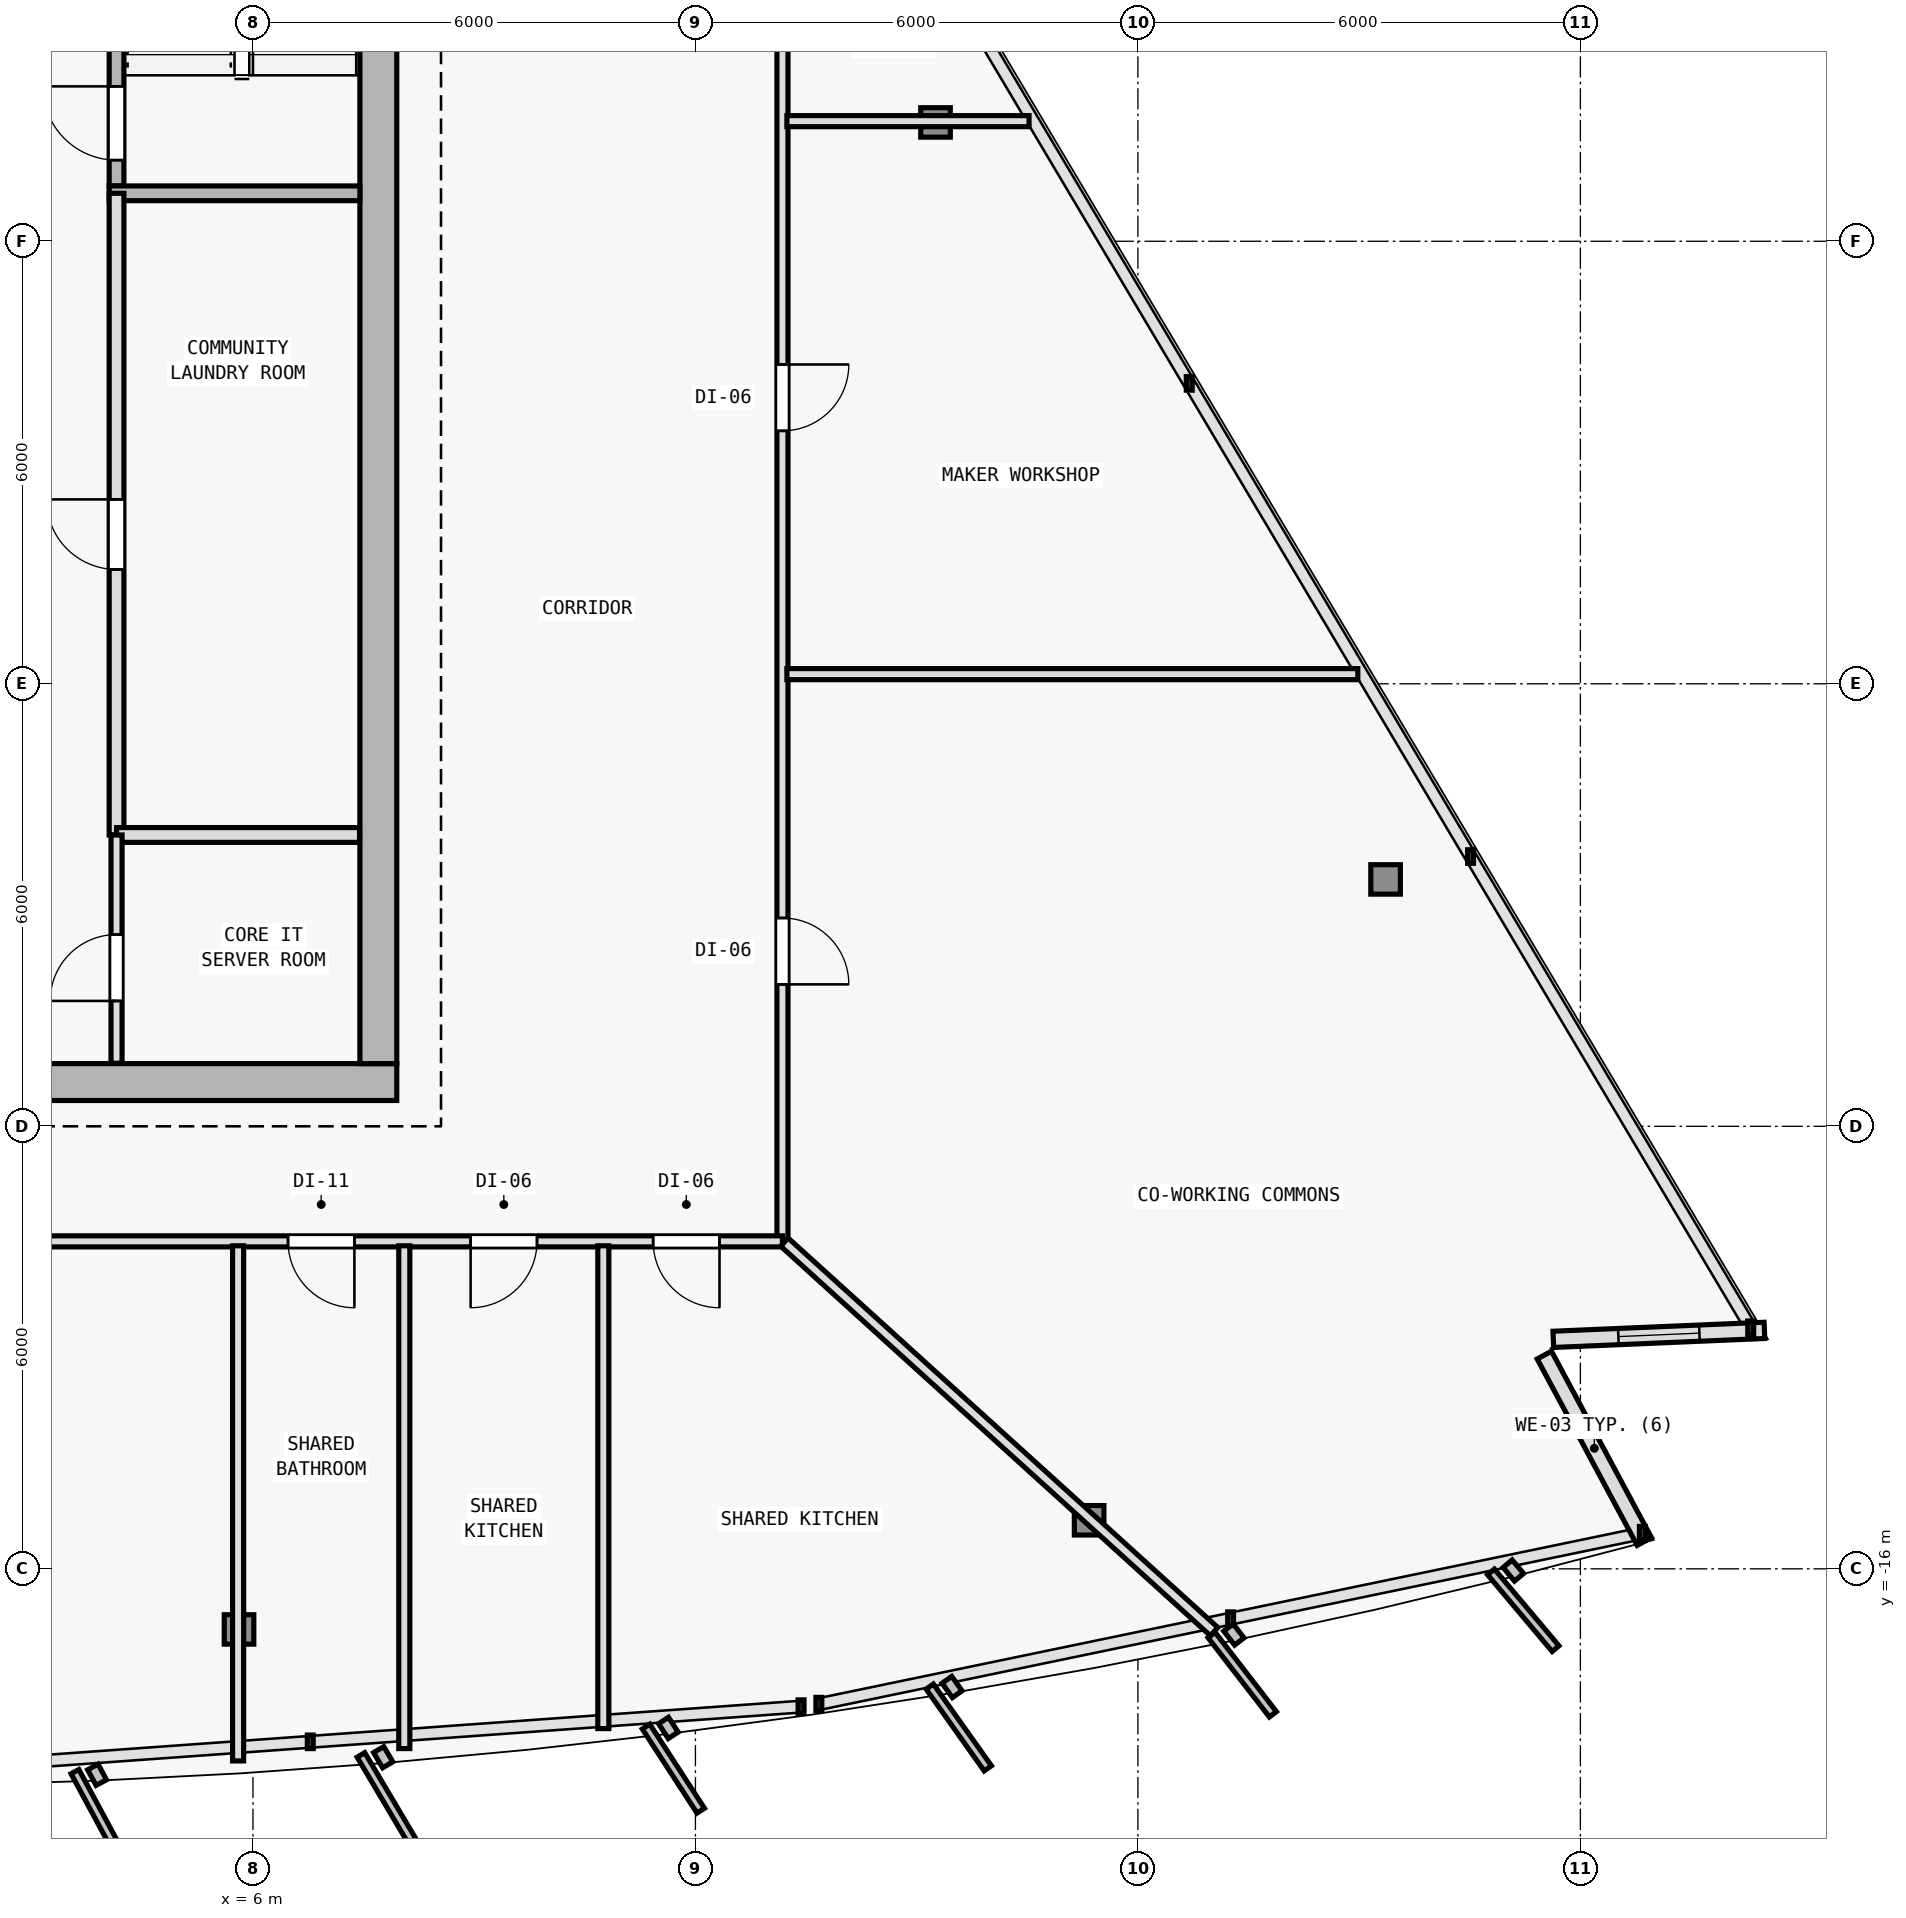
"""IFC4 building model, lengths in metres.
Left out: names, types, materials, properties, quantities, classifications, styles, units other than length and angle.
Written with IfcOpenShell. Run it as: python <this file> out.ifc"""

import sys

from ifc_helpers import new_model, si_unit, direction, frame, frame_2d, origin, origin_2d, place, context, subcontext, project, spatial, rectangle, i_section, extrude, element, fill, save


model = new_model("IFC4")
c1 = context("Model", 3, precision=1e-05, world=origin(), true_north=direction((0.0, 1.0)))
c2 = subcontext(c1, "Body", "Model", "MODEL_VIEW")
j1 = project(units=[si_unit("LENGTHUNIT", "METRE"), si_unit("PLANEANGLEUNIT", "RADIAN")], contexts=[c1])
p1 = place(None, origin())
s1 = spatial("IfcSite", under=j1, at=p1, CompositionType="ELEMENT")
p2 = place(p1, origin())
s2 = spatial("IfcBuilding", under=s1, at=p2, CompositionType="ELEMENT")
p3 = place(p2, frame((0.0, 0.0, 178.2)))
s3 = spatial("IfcBuildingStorey", under=s2, at=p3, CompositionType="ELEMENT", Elevation=178.2)
for number, where, z_axis, x_axis in (
    (1, (7.7, -9.4, 0.0), (0.0, 0.0, 1.0), (1.0, 0.0, 0.0)),
    (2, (7.7, 0.4, 0.0), (0.0, 0.0, 1.0), (1.0, 0.0, 0.0)),
):
    element("IfcColumn", number, at=place(p3, frame(where, z_axis=z_axis, x_axis=x_axis)), inside=s3, PredefinedType="COLUMN", context=c2, shape_type="SweptSolid", body=[
        extrude(i_section(OverallWidth=0.404, OverallDepth=0.407, WebThickness=0.017, FlangeThickness=0.028, FilletRadius=0.015, at=origin_2d()), origin(), (0.0, 0.0, 1.0), 3.6),
    ])
p4 = place(p3, frame((5.811, -16.822, 0.006), z_axis=(-0.006934288159, 0.035283289748, 0.999353293441), x_axis=(-0.981229659911, -0.192842823335, 0.0)))
e3 = element("IfcColumn", 3, at=p4, inside=s3, PredefinedType="COLUMN", context=c2, shape_type="SweptSolid", body=[
    extrude(i_section(OverallWidth=0.401, OverallDepth=0.399, WebThickness=0.016, FlangeThickness=0.025, FilletRadius=0.015, at=origin_2d()), origin(), (0.0, 0.0, 1.0), 3.591),
])
p5 = place(p3, frame((17.338, -15.342, 0.006), z_axis=(-0.020596292833, 0.033511459955, 0.999226087917), x_axis=(-0.851954850327, -0.523615252838, 0.0)))
e4 = element("IfcColumn", 4, at=p5, inside=s3, PredefinedType="COLUMN", context=c2, shape_type="SweptSolid", body=[
    extrude(i_section(OverallWidth=0.401, OverallDepth=0.399, WebThickness=0.016, FlangeThickness=0.025, FilletRadius=0.015, at=origin_2d()), origin(), (0.0, 0.0, 1.0), 3.592),
])
p6 = place(p3, frame((21.358, -6.653, 0.006), z_axis=(-0.026107436898, 0.021620221181, 0.999425318758), x_axis=(-0.637813971185, -0.770190455771, 0.0)))
e5 = element("IfcColumn", 5, at=p6, inside=s3, PredefinedType="COLUMN", context=c2, shape_type="SweptSolid", body=[
    extrude(i_section(OverallWidth=0.401, OverallDepth=0.399, WebThickness=0.016, FlangeThickness=0.025, FilletRadius=0.015, at=origin_2d()), origin(), (0.0, 0.0, 1.0), 3.591),
])
p7 = place(p3, frame((15.255, 3.611, 0.006), z_axis=(-0.018907314261, 0.009589680974, 0.999775250487), x_axis=(-0.452339157861, -0.891845999187, 0.0)))
e6 = element("IfcColumn", 6, at=p7, inside=s3, PredefinedType="COLUMN", context=c2, shape_type="SweptSolid", body=[
    extrude(i_section(OverallWidth=0.401, OverallDepth=0.399, WebThickness=0.016, FlangeThickness=0.025, FilletRadius=0.015, at=origin_2d()), origin(), (0.0, 0.0, 1.0), 3.59),
])
p8 = place(p3, frame((23.511, -13.102, 0.0), z_axis=(0.0, 0.0, 1.0), x_axis=(0.472804807667, -0.881167188362, 0.0)))
e7 = element("IfcWall", 7, at=p8, inside=s3, PredefinedType="SOLIDWALL", context=c2, shape_type="SweptSolid", body=[
    extrude(rectangle(XDim=2.868, YDim=0.22, at=frame_2d((1.434, 0.0))), origin(), (0.0, 0.0, 1.0), 3.35),
])
p9 = place(p3, frame((26.496, -12.767, 0.0), z_axis=(0.0, 0.0, 1.0), x_axis=(-0.999095763679, -0.042516526188, 0.0)))
e8 = element("IfcWall", 8, at=p9, inside=s3, PredefinedType="SOLIDWALL", context=c2, shape_type="SweptSolid", body=[
    extrude(rectangle(XDim=2.865, YDim=0.22, at=frame_2d((1.433, 0.0))), origin(), (0.0, 0.0, 1.0), 3.35),
])
p10 = place(p9, frame((0.883, 0.0, 0.62)))
e9 = element("IfcOpeningElement", 9, at=p10, cuts=e8, PredefinedType="OPENING", context=c2, shape_type="SweptSolid", body=[
    extrude(rectangle(XDim=1.1, YDim=1.8, at=frame_2d((0.55, 0.9))), frame((0.0, 0.12, 0.0), z_axis=(0.0, -1.0, 0.0), x_axis=(1.0, 0.0, 0.0)), (0.0, 0.0, 1.0), 0.24),
])
p11 = place(p3, frame((-7.95, -9.4, 0.0), z_axis=(0.0, 0.0, 1.0), x_axis=(1.0, 0.0, 0.0)))
e10 = element("IfcWall", 10, at=p11, inside=s3, PredefinedType="SHEAR", context=c2, shape_type="SweptSolid", body=[
    extrude(rectangle(XDim=15.9, YDim=0.5, at=frame_2d((7.95, 0.0))), origin(), (0.0, 0.0, 1.0), 3.35),
])
p12 = place(p11, frame((9.6, 0.0, 0.0)))
e11 = element("IfcOpeningElement", 11, at=p12, cuts=e10, PredefinedType="OPENING", context=c2, shape_type="SweptSolid", body=[
    extrude(rectangle(XDim=1.5, YDim=2.2, at=frame_2d((0.75, 1.1))), frame((0.0, 0.26, 0.0), z_axis=(0.0, -1.0, 0.0), x_axis=(1.0, 0.0, 0.0)), (0.0, 0.0, 1.0), 0.52),
])
p13 = place(p3, frame((7.7, 9.95, 0.0), z_axis=(0.0, 0.0, 1.0), x_axis=(0.0, -1.0, 0.0)))
e12 = element("IfcWall", 12, at=p13, inside=s3, PredefinedType="SHEAR", context=c2, shape_type="SweptSolid", body=[
    extrude(rectangle(XDim=19.1, YDim=0.5, at=frame_2d((9.55, 0.0))), origin(), (0.0, 0.0, 1.0), 3.35),
])
p14 = place(p3, frame((4.15, 2.75, 0.0), z_axis=(0.0, 0.0, 1.0), x_axis=(0.0, 1.0, 0.0)))
e13 = element("IfcWall", 13, at=p14, inside=s3, PredefinedType="SOLIDWALL", context=c2, shape_type="SweptSolid", body=[
    extrude(rectangle(XDim=7.2, YDim=0.2, at=frame_2d((3.6, 0.0))), origin(), (0.0, 0.0, 1.0), 3.35),
])
p15 = place(p14, frame((0.35, 0.0, 0.0)))
e14 = element("IfcOpeningElement", 14, at=p15, cuts=e13, PredefinedType="OPENING", context=c2, shape_type="SweptSolid", body=[
    extrude(rectangle(XDim=1.0, YDim=2.15, at=frame_2d((0.5, 1.075))), frame((0.0, 0.11, 0.0), z_axis=(0.0, -1.0, 0.0), x_axis=(1.0, 0.0, 0.0)), (0.0, 0.0, 1.0), 0.22),
])
p16 = place(p3, frame((4.05, 2.65, 0.0), z_axis=(0.0, 0.0, 1.0), x_axis=(1.0, 0.0, 0.0)))
e15 = element("IfcWall", 15, at=p16, inside=s3, PredefinedType="SOLIDWALL", context=c2, shape_type="SweptSolid", body=[
    extrude(rectangle(XDim=3.4, YDim=0.2, at=frame_2d((1.7, 0.0))), origin(), (0.0, 0.0, 1.0), 3.35),
])
p17 = place(p3, frame((4.15, -6.05, 0.0), z_axis=(0.0, 0.0, 1.0), x_axis=(0.0, 1.0, 0.0)))
e16 = element("IfcWall", 16, at=p17, inside=s3, PredefinedType="SOLIDWALL", context=c2, shape_type="SweptSolid", body=[
    extrude(rectangle(XDim=8.7, YDim=0.2, at=frame_2d((4.35, 0.0))), origin(), (0.0, 0.0, 1.0), 3.35),
])
p18 = place(p17, frame((3.6, 0.0, 0.0)))
e17 = element("IfcOpeningElement", 17, at=p18, cuts=e16, PredefinedType="OPENING", context=c2, shape_type="SweptSolid", body=[
    extrude(rectangle(XDim=0.95, YDim=2.1, at=frame_2d((0.475, 1.05))), frame((0.0, 0.11, 0.0), z_axis=(0.0, -1.0, 0.0), x_axis=(1.0, 0.0, 0.0)), (0.0, 0.0, 1.0), 0.22),
])
p19 = place(p3, frame((4.15, -6.05, 0.0), z_axis=(0.0, 0.0, 1.0), x_axis=(1.0, 0.0, 0.0)))
e18 = element("IfcWall", 18, at=p19, inside=s3, PredefinedType="SOLIDWALL", context=c2, shape_type="SweptSolid", body=[
    extrude(rectangle(XDim=3.295, YDim=0.2, at=frame_2d((1.647, 0.0))), origin(), (0.0, 0.0, 1.0), 3.35),
])
p20 = place(p3, frame((4.15, -9.145, 0.0), z_axis=(0.0, 0.0, 1.0), x_axis=(0.0, 1.0, 0.0)))
e19 = element("IfcWall", 19, at=p20, inside=s3, PredefinedType="PARTITIONING", context=c2, shape_type="SweptSolid", body=[
    extrude(rectangle(XDim=3.095, YDim=0.15, at=frame_2d((1.547, 0.0))), origin(), (0.0, 0.0, 1.0), 3.35),
])
p21 = place(p20, frame((0.845, 0.0, 0.0)))
e20 = element("IfcOpeningElement", 20, at=p21, cuts=e19, PredefinedType="OPENING", context=c2, shape_type="SweptSolid", body=[
    extrude(rectangle(XDim=0.9, YDim=2.1, at=frame_2d((0.45, 1.05))), frame((0.0, 0.085, 0.0), z_axis=(0.0, -1.0, 0.0), x_axis=(1.0, 0.0, 0.0)), (0.0, 0.0, 1.0), 0.17),
])
p22 = place(p3, frame((13.18, 8.444, 0.0), z_axis=(0.0, 0.0, 1.0), x_axis=(0.0, -1.0, 0.0)))
e21 = element("IfcWall", 21, at=p22, inside=s3, PredefinedType="PARTITIONING", context=c2, shape_type="SweptSolid", body=[
    extrude(rectangle(XDim=20.004, YDim=0.15, at=frame_2d((10.002, 0.0))), origin(), (0.0, 0.0, 1.0), 2.825),
])
p23 = place(p22, frame((15.619, 0.0, 0.0)))
e22 = element("IfcOpeningElement", 22, at=p23, cuts=e21, PredefinedType="OPENING", context=c2, shape_type="SweptSolid", body=[
    extrude(rectangle(XDim=0.9, YDim=2.1, at=frame_2d((0.45, 1.05))), frame((0.0, 0.085, 0.0), z_axis=(0.0, -1.0, 0.0), x_axis=(1.0, 0.0, 0.0)), (0.0, 0.0, 1.0), 0.17),
])
p24 = place(p22, frame((8.115, 0.0, 0.0)))
e23 = element("IfcOpeningElement", 23, at=p24, cuts=e21, PredefinedType="OPENING", context=c2, shape_type="SweptSolid", body=[
    extrude(rectangle(XDim=0.9, YDim=2.1, at=frame_2d((0.45, 1.05))), frame((0.0, 0.085, 0.0), z_axis=(0.0, -1.0, 0.0), x_axis=(1.0, 0.0, 0.0)), (0.0, 0.0, 1.0), 0.17),
])
p25 = place(p22, frame((2.047, 0.0, 0.0)))
e24 = element("IfcOpeningElement", 24, at=p25, cuts=e21, PredefinedType="OPENING", context=c2, shape_type="SweptSolid", body=[
    extrude(rectangle(XDim=0.9, YDim=2.1, at=frame_2d((0.45, 1.05))), frame((0.0, 0.085, 0.0), z_axis=(0.0, -1.0, 0.0), x_axis=(1.0, 0.0, 0.0)), (0.0, 0.0, 1.0), 0.17),
])
p26 = place(p3, frame((13.18, -11.56, 0.0), z_axis=(0.0, 0.0, 1.0), x_axis=(-1.0, 0.0, 0.0)))
e25 = element("IfcWall", 25, at=p26, inside=s3, PredefinedType="PARTITIONING", context=c2, shape_type="SweptSolid", body=[
    extrude(rectangle(XDim=23.04, YDim=0.15, at=frame_2d((11.52, 0.0))), origin(), (0.0, 0.0, 1.0), 2.825),
])
p27 = place(p26, frame((14.671, 0.0, 0.0)))
e26 = element("IfcOpeningElement", 26, at=p27, cuts=e25, PredefinedType="OPENING", context=c2, shape_type="SweptSolid", body=[
    extrude(rectangle(XDim=0.9, YDim=2.1, at=frame_2d((0.45, 1.05))), frame((0.0, 0.085, 0.0), z_axis=(0.0, -1.0, 0.0), x_axis=(1.0, 0.0, 0.0)), (0.0, 0.0, 1.0), 0.17),
])
p28 = place(p26, frame((5.805, 0.0, 0.0)))
e27 = element("IfcOpeningElement", 27, at=p28, cuts=e25, PredefinedType="OPENING", context=c2, shape_type="SweptSolid", body=[
    extrude(rectangle(XDim=0.9, YDim=2.1, at=frame_2d((0.45, 1.05))), frame((0.0, 0.085, 0.0), z_axis=(0.0, -1.0, 0.0), x_axis=(1.0, 0.0, 0.0)), (0.0, 0.0, 1.0), 0.17),
])
p29 = place(p26, frame((3.328, 0.0, 0.0)))
e28 = element("IfcOpeningElement", 28, at=p29, cuts=e25, PredefinedType="OPENING", context=c2, shape_type="SweptSolid", body=[
    extrude(rectangle(XDim=0.9, YDim=2.1, at=frame_2d((0.45, 1.05))), frame((0.0, 0.085, 0.0), z_axis=(0.0, -1.0, 0.0), x_axis=(1.0, 0.0, 0.0)), (0.0, 0.0, 1.0), 0.17),
])
p30 = place(p26, frame((0.854, 0.0, 0.0)))
e29 = element("IfcOpeningElement", 29, at=p30, cuts=e25, PredefinedType="OPENING", context=c2, shape_type="SweptSolid", body=[
    extrude(rectangle(XDim=0.9, YDim=2.1, at=frame_2d((0.45, 1.05))), frame((0.0, 0.085, 0.0), z_axis=(0.0, -1.0, 0.0), x_axis=(1.0, 0.0, 0.0)), (0.0, 0.0, 1.0), 0.17),
])
p31 = place(p3, frame((5.799, -11.62, 0.0), z_axis=(0.0, 0.0, 1.0), x_axis=(0.0, -1.0, 0.0)))
e30 = element("IfcWall", 30, at=p31, inside=s3, PredefinedType="PARTITIONING", context=c2, shape_type="SweptSolid", body=[
    extrude(rectangle(XDim=6.984, YDim=0.15, at=frame_2d((3.492, 0.0))), origin(), (0.0, 0.0, 1.0), 2.935),
])
p32 = place(p3, frame((13.207, -11.57, 0.0), z_axis=(0.0, 0.0, 1.0), x_axis=(0.740935293124, -0.671576422609, 0.0)))
e31 = element("IfcWall", 31, at=p32, inside=s3, PredefinedType="PARTITIONING", context=c2, shape_type="SweptSolid", body=[
    extrude(rectangle(XDim=7.864, YDim=0.15, at=frame_2d((3.932, 0.0))), origin(), (0.0, 0.0, 1.0), 2.825),
])
p33 = place(p3, frame((13.24, 3.628, 0.0), z_axis=(0.0, 0.0, 1.0), x_axis=(1.0, 0.0, 0.0)))
e32 = element("IfcWall", 32, at=p33, inside=s3, PredefinedType="PARTITIONING", context=c2, shape_type="SweptSolid", body=[
    extrude(rectangle(XDim=3.284, YDim=0.15, at=frame_2d((1.642, 0.0))), origin(), (0.0, 0.0, 1.0), 2.935),
])
p34 = place(p3, frame((10.751, -11.62, 0.0), z_axis=(0.0, 0.0, 1.0), x_axis=(0.0, -1.0, 0.0)))
e33 = element("IfcWall", 33, at=p34, inside=s3, PredefinedType="PARTITIONING", context=c2, shape_type="SweptSolid", body=[
    extrude(rectangle(XDim=6.546, YDim=0.15, at=frame_2d((3.273, 0.0))), origin(), (0.0, 0.0, 1.0), 2.935),
])
p35 = place(p3, frame((8.052, -11.62, 0.0), z_axis=(0.0, 0.0, 1.0), x_axis=(0.0, -1.0, 0.0)))
e34 = element("IfcWall", 34, at=p35, inside=s3, PredefinedType="PARTITIONING", context=c2, shape_type="SweptSolid", body=[
    extrude(rectangle(XDim=6.817, YDim=0.15, at=frame_2d((3.408, 0.0))), origin(), (0.0, 0.0, 1.0), 2.935),
])
p36 = place(p3, frame((13.24, -3.869, 0.0), z_axis=(0.0, 0.0, 1.0), x_axis=(1.0, 0.0, 0.0)))
e35 = element("IfcWall", 35, at=p36, inside=s3, PredefinedType="PARTITIONING", context=c2, shape_type="SweptSolid", body=[
    extrude(rectangle(XDim=7.742, YDim=0.15, at=frame_2d((3.871, 0.0))), origin(), (0.0, 0.0, 1.0), 2.935),
])
p37 = place(p10, origin())
e36 = element("IfcWindow", 36, at=p37, inside=s3, PartitioningType="SINGLE_PANEL", PredefinedType="WINDOW", context=c2, shape_type="SweptSolid", body=[
    extrude(rectangle(XDim=1.1, YDim=1.8, at=frame_2d((0.55, 0.9))), frame((0.0, 0.03, 0.0), z_axis=(0.0, -1.0, 0.0), x_axis=(1.0, 0.0, 0.0)), (0.0, 0.0, 1.0), 0.06),
])
fill(e9, e36)
p38 = place(p15, origin())
e37 = element("IfcDoor", 37, at=p38, inside=s3, OperationType="SINGLE_SWING_RIGHT", PredefinedType="DOOR", context=c2, shape_type="SweptSolid", body=[
    extrude(rectangle(XDim=1.0, YDim=2.15, at=frame_2d((0.5, 1.075))), frame((0.0, 0.025, 0.0), z_axis=(0.0, -1.0, 0.0), x_axis=(1.0, 0.0, 0.0)), (0.0, 0.0, 1.0), 0.05),
])
fill(e14, e37)
p39 = place(p18, origin())
e38 = element("IfcDoor", 38, at=p39, inside=s3, OperationType="SINGLE_SWING_RIGHT", PredefinedType="DOOR", context=c2, shape_type="SweptSolid", body=[
    extrude(rectangle(XDim=0.95, YDim=2.1, at=frame_2d((0.475, 1.05))), frame((0.0, 0.025, 0.0), z_axis=(0.0, -1.0, 0.0), x_axis=(1.0, 0.0, 0.0)), (0.0, 0.0, 1.0), 0.05),
])
fill(e17, e38)
p40 = place(p21, origin())
e39 = element("IfcDoor", 39, at=p40, inside=s3, OperationType="SINGLE_SWING_LEFT", PredefinedType="DOOR", context=c2, shape_type="SweptSolid", body=[
    extrude(rectangle(XDim=0.9, YDim=2.1, at=frame_2d((0.45, 1.05))), frame((0.0, 0.025, 0.0), z_axis=(0.0, -1.0, 0.0), x_axis=(1.0, 0.0, 0.0)), (0.0, 0.0, 1.0), 0.05),
])
fill(e20, e39)
p41 = place(p28, origin())
e40 = element("IfcDoor", 40, at=p41, inside=s3, OperationType="SINGLE_SWING_LEFT", PredefinedType="DOOR", context=c2, shape_type="SweptSolid", body=[
    extrude(rectangle(XDim=0.9, YDim=2.1, at=frame_2d((0.45, 1.05))), frame((0.0, 0.025, 0.0), z_axis=(0.0, -1.0, 0.0), x_axis=(1.0, 0.0, 0.0)), (0.0, 0.0, 1.0), 0.05),
])
fill(e27, e40)
p42 = place(p29, origin())
e41 = element("IfcDoor", 41, at=p42, inside=s3, OperationType="SINGLE_SWING_RIGHT", PredefinedType="DOOR", context=c2, shape_type="SweptSolid", body=[
    extrude(rectangle(XDim=0.9, YDim=2.1, at=frame_2d((0.45, 1.05))), frame((0.0, 0.025, 0.0), z_axis=(0.0, -1.0, 0.0), x_axis=(1.0, 0.0, 0.0)), (0.0, 0.0, 1.0), 0.05),
])
fill(e28, e41)
p43 = place(p30, origin())
e42 = element("IfcDoor", 42, at=p43, inside=s3, OperationType="SINGLE_SWING_LEFT", PredefinedType="DOOR", context=c2, shape_type="SweptSolid", body=[
    extrude(rectangle(XDim=0.9, YDim=2.1, at=frame_2d((0.45, 1.05))), frame((0.0, 0.025, 0.0), z_axis=(0.0, -1.0, 0.0), x_axis=(1.0, 0.0, 0.0)), (0.0, 0.0, 1.0), 0.05),
])
fill(e29, e42)
p44 = place(p23, origin())
e43 = element("IfcDoor", 43, at=p44, inside=s3, OperationType="SINGLE_SWING_RIGHT", PredefinedType="DOOR", context=c2, shape_type="SweptSolid", body=[
    extrude(rectangle(XDim=0.9, YDim=2.1, at=frame_2d((0.45, 1.05))), frame((0.0, 0.025, 0.0), z_axis=(0.0, -1.0, 0.0), x_axis=(1.0, 0.0, 0.0)), (0.0, 0.0, 1.0), 0.05),
])
fill(e22, e43)
p45 = place(p24, origin())
e44 = element("IfcDoor", 44, at=p45, inside=s3, OperationType="SINGLE_SWING_LEFT", PredefinedType="DOOR", context=c2, shape_type="SweptSolid", body=[
    extrude(rectangle(XDim=0.9, YDim=2.1, at=frame_2d((0.45, 1.05))), frame((0.0, 0.025, 0.0), z_axis=(0.0, -1.0, 0.0), x_axis=(1.0, 0.0, 0.0)), (0.0, 0.0, 1.0), 0.05),
])
fill(e23, e44)
save(model, sys.argv[1])
